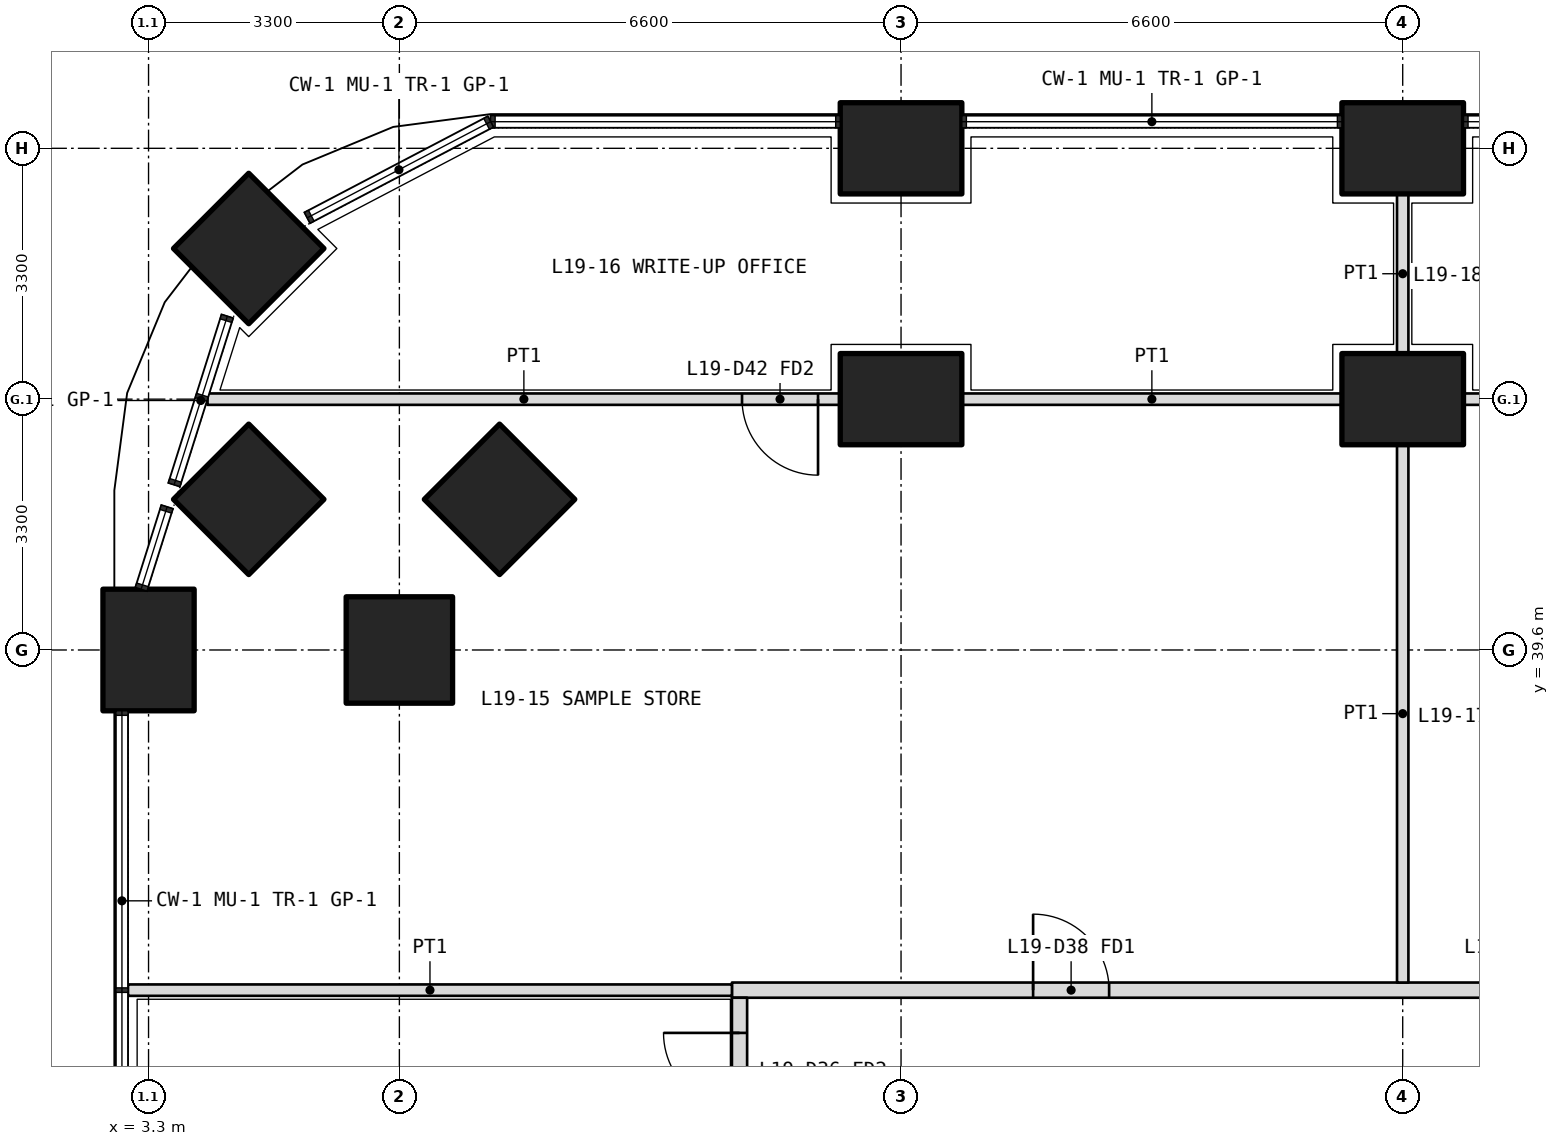
"""IFC4 building model, lengths in metres.
Left out: names, types, materials, properties, quantities, classifications, styles, units other than length and angle.
Written with IfcOpenShell. Run it as: python <this file> out.ifc"""

import sys

from ifc_helpers import new_model, si_unit, direction, frame, frame_2d, origin, origin_2d, place, context, subcontext, project, spatial, rectangle, extrude, element, fill, save


model = new_model("IFC4")
c1 = context("Model", 3, precision=1e-05, world=origin(), true_north=direction((0.0, 1.0)))
c2 = subcontext(c1, "Body", "Model", "MODEL_VIEW")
j1 = project(units=[si_unit("LENGTHUNIT", "METRE"), si_unit("PLANEANGLEUNIT", "RADIAN")], contexts=[c1])
p1 = place(None, origin())
s1 = spatial("IfcSite", under=j1, at=p1, CompositionType="ELEMENT")
p2 = place(p1, origin())
s2 = spatial("IfcBuilding", under=s1, at=p2, CompositionType="ELEMENT")
p3 = place(p2, frame((0.0, 0.0, 86.4)))
s3 = spatial("IfcBuildingStorey", under=s2, at=p3, CompositionType="ELEMENT", Elevation=86.4)
p4 = place(p3, frame((4.618, 44.882, 0.0), z_axis=(0.0, 0.0, 1.0), x_axis=(0.707106781187, 0.707106781187, 0.0)))
e1 = element("IfcColumn", 1, at=p4, inside=s3, PredefinedType="COLUMN", context=c2, shape_type="SweptSolid", body=[
    extrude(rectangle(XDim=1.4, YDim=1.4, at=origin_2d()), origin(), (0.0, 0.0, 1.0), 4.2),
])
for number, where, z_axis, x_axis in (
    (2, (3.3, 39.6, 0.0), (0.0, 0.0, 1.0), (0.0, 1.0, 0.0)),
    (3, (13.2, 46.2, 0.0), (0.0, 0.0, 1.0), (1.0, 0.0, 0.0)),
    (4, (19.8, 46.2, 0.0), (0.0, 0.0, 1.0), (1.0, 0.0, 0.0)),
):
    element("IfcColumn", number, at=place(p3, frame(where, z_axis=z_axis, x_axis=x_axis)), inside=s3, PredefinedType="COLUMN", context=c2, shape_type="SweptSolid", body=[
        extrude(rectangle(XDim=1.6, YDim=1.2, at=origin_2d()), origin(), (0.0, 0.0, 1.0), 4.2),
    ])
for number, where, z_axis, x_axis in (
    (5, (6.6, 39.6, 0.0), (0.0, 0.0, 1.0), (1.0, 0.0, 0.0)),
    (6, (4.618, 41.582, 0.0), (0.0, 0.0, 1.0), (0.707, 0.707, 0.0)),
):
    element("IfcColumn", number, at=place(p3, frame(where, z_axis=z_axis, x_axis=x_axis)), inside=s3, PredefinedType="COLUMN", context=c2, shape_type="SweptSolid", body=[
        extrude(rectangle(XDim=1.4, YDim=1.4, at=origin_2d()), origin(), (0.0, 0.0, 1.0), 4.2),
    ])
for number, where, z_axis, x_axis in (
    (7, (13.2, 42.9, 0.0), (0.0, 0.0, 1.0), (1.0, 0.0, 0.0)),
    (8, (19.8, 42.9, 0.0), (0.0, 0.0, 1.0), (1.0, 0.0, 0.0)),
):
    element("IfcColumn", number, at=place(p3, frame(where, z_axis=z_axis, x_axis=x_axis)), inside=s3, PredefinedType="COLUMN", context=c2, shape_type="SweptSolid", body=[
        extrude(rectangle(XDim=1.6, YDim=1.2, at=origin_2d()), origin(), (0.0, 0.0, 1.0), 4.2),
    ])
p5 = place(p3, frame((7.918, 41.582, 0.0), z_axis=(0.0, 0.0, 1.0), x_axis=(0.707106781187, 0.707106781187, 0.0)))
e9 = element("IfcColumn", 9, at=p5, inside=s3, PredefinedType="COLUMN", context=c2, shape_type="SweptSolid", body=[
    extrude(rectangle(XDim=1.4, YDim=1.4, at=origin_2d()), origin(), (0.0, 0.0, 1.0), 4.2),
])
p6 = place(p3, frame((10.975, 35.125, 0.0), z_axis=(0.0, 0.0, 1.0), x_axis=(1.0, 0.0, 0.0)))
e10 = element("IfcWall", 10, at=p6, inside=s3, PredefinedType="PARTITIONING", context=c2, shape_type="SweptSolid", body=[
    extrude(rectangle(XDim=30.85, YDim=0.2, at=frame_2d((15.425, 0.0))), origin(), (0.0, 0.0, 1.0), 2.85),
])
p7 = place(p6, frame((3.962, 0.0, 0.0)))
e11 = element("IfcOpeningElement", 11, at=p7, cuts=e10, PredefinedType="OPENING", context=c2, shape_type="SweptSolid", body=[
    extrude(rectangle(XDim=1.0, YDim=2.1, at=frame_2d((0.5, 1.05))), frame((0.0, 0.11, 0.0), z_axis=(0.0, -1.0, 0.0), x_axis=(1.0, 0.0, 0.0)), (0.0, 0.0, 1.0), 0.22),
])
p8 = place(p6, frame((9.975, 0.0, 0.0)))
e12 = element("IfcOpeningElement", 12, at=p8, cuts=e10, PredefinedType="OPENING", context=c2, shape_type="SweptSolid", body=[
    extrude(rectangle(XDim=1.0, YDim=2.1, at=frame_2d((0.5, 1.05))), frame((0.0, 0.11, 0.0), z_axis=(0.0, -1.0, 0.0), x_axis=(1.0, 0.0, 0.0)), (0.0, 0.0, 1.0), 0.22),
])
p9 = place(p6, frame((14.825, 0.0, 0.0)))
e13 = element("IfcOpeningElement", 13, at=p9, cuts=e10, PredefinedType="OPENING", context=c2, shape_type="SweptSolid", body=[
    extrude(rectangle(XDim=1.2, YDim=2.1, at=frame_2d((0.6, 1.05))), frame((0.0, 0.11, 0.0), z_axis=(0.0, -1.0, 0.0), x_axis=(1.0, 0.0, 0.0)), (0.0, 0.0, 1.0), 0.22),
])
p10 = place(p6, frame((24.238, 0.0, 0.0)))
e14 = element("IfcOpeningElement", 14, at=p10, cuts=e10, PredefinedType="OPENING", context=c2, shape_type="SweptSolid", body=[
    extrude(rectangle(XDim=1.0, YDim=2.1, at=frame_2d((0.5, 1.05))), frame((0.0, 0.11, 0.0), z_axis=(0.0, -1.0, 0.0), x_axis=(1.0, 0.0, 0.0)), (0.0, 0.0, 1.0), 0.22),
])
p11 = place(p3, frame((11.075, 7.4, 0.0), z_axis=(0.0, 0.0, 1.0), x_axis=(0.0, 1.0, 0.0)))
e15 = element("IfcWall", 15, at=p11, inside=s3, PredefinedType="PARTITIONING", context=c2, shape_type="SweptSolid", body=[
    extrude(rectangle(XDim=27.625, YDim=0.2, at=frame_2d((13.812, 0.0))), origin(), (0.0, 0.0, 1.0), 2.85),
])
p12 = place(p11, frame((2.35, 0.0, 0.0)))
e16 = element("IfcOpeningElement", 16, at=p12, cuts=e15, PredefinedType="OPENING", context=c2, shape_type="SweptSolid", body=[
    extrude(rectangle(XDim=1.0, YDim=2.1, at=frame_2d((0.5, 1.05))), frame((0.0, 0.11, 0.0), z_axis=(0.0, -1.0, 0.0), x_axis=(1.0, 0.0, 0.0)), (0.0, 0.0, 1.0), 0.22),
])
p13 = place(p11, frame((6.35, 0.0, 0.0)))
e17 = element("IfcOpeningElement", 17, at=p13, cuts=e15, PredefinedType="OPENING", context=c2, shape_type="SweptSolid", body=[
    extrude(rectangle(XDim=1.0, YDim=2.1, at=frame_2d((0.5, 1.05))), frame((0.0, 0.11, 0.0), z_axis=(0.0, -1.0, 0.0), x_axis=(1.0, 0.0, 0.0)), (0.0, 0.0, 1.0), 0.22),
])
p14 = place(p11, frame((9.425, 0.0, 0.0)))
e18 = element("IfcOpeningElement", 18, at=p14, cuts=e15, PredefinedType="OPENING", context=c2, shape_type="SweptSolid", body=[
    extrude(rectangle(XDim=0.9, YDim=2.1, at=frame_2d((0.45, 1.05))), frame((0.0, 0.11, 0.0), z_axis=(0.0, -1.0, 0.0), x_axis=(1.0, 0.0, 0.0)), (0.0, 0.0, 1.0), 0.22),
])
p15 = place(p11, frame((13.275, 0.0, 0.0)))
e19 = element("IfcOpeningElement", 19, at=p15, cuts=e15, PredefinedType="OPENING", context=c2, shape_type="SweptSolid", body=[
    extrude(rectangle(XDim=0.9, YDim=2.1, at=frame_2d((0.45, 1.05))), frame((0.0, 0.11, 0.0), z_axis=(0.0, -1.0, 0.0), x_axis=(1.0, 0.0, 0.0)), (0.0, 0.0, 1.0), 0.22),
])
p16 = place(p11, frame((16.8, 0.0, 0.0)))
e20 = element("IfcOpeningElement", 20, at=p16, cuts=e15, PredefinedType="OPENING", context=c2, shape_type="SweptSolid", body=[
    extrude(rectangle(XDim=1.0, YDim=2.1, at=frame_2d((0.5, 1.05))), frame((0.0, 0.11, 0.0), z_axis=(0.0, -1.0, 0.0), x_axis=(1.0, 0.0, 0.0)), (0.0, 0.0, 1.0), 0.22),
])
p17 = place(p11, frame((20.15, 0.0, 0.0)))
e21 = element("IfcOpeningElement", 21, at=p17, cuts=e15, PredefinedType="OPENING", context=c2, shape_type="SweptSolid", body=[
    extrude(rectangle(XDim=1.0, YDim=2.1, at=frame_2d((0.5, 1.05))), frame((0.0, 0.11, 0.0), z_axis=(0.0, -1.0, 0.0), x_axis=(1.0, 0.0, 0.0)), (0.0, 0.0, 1.0), 0.22),
])
p18 = place(p11, frame((23.45, 0.0, 0.0)))
e22 = element("IfcOpeningElement", 22, at=p18, cuts=e15, PredefinedType="OPENING", context=c2, shape_type="SweptSolid", body=[
    extrude(rectangle(XDim=1.0, YDim=2.1, at=frame_2d((0.5, 1.05))), frame((0.0, 0.11, 0.0), z_axis=(0.0, -1.0, 0.0), x_axis=(1.0, 0.0, 0.0)), (0.0, 0.0, 1.0), 0.22),
])
p19 = place(p11, frame((26.163, 0.0, 0.0)))
e23 = element("IfcOpeningElement", 23, at=p19, cuts=e15, PredefinedType="OPENING", context=c2, shape_type="SweptSolid", body=[
    extrude(rectangle(XDim=1.0, YDim=2.1, at=frame_2d((0.5, 1.05))), frame((0.0, 0.11, 0.0), z_axis=(0.0, -1.0, 0.0), x_axis=(1.0, 0.0, 0.0)), (0.0, 0.0, 1.0), 0.22),
])
p20 = place(p3, frame((3.03, 35.125, 0.0), z_axis=(0.0, 0.0, 1.0), x_axis=(1.0, 0.0, 0.0)))
e24 = element("IfcWall", 24, at=p20, inside=s3, PredefinedType="PARTITIONING", context=c2, shape_type="SweptSolid", body=[
    extrude(rectangle(XDim=7.945, YDim=0.15, at=frame_2d((3.973, 0.0))), origin(), (0.0, 0.0, 1.0), 2.7),
])
p21 = place(p3, frame((25.6, 42.9, 0.0), z_axis=(0.0, 0.0, 1.0), x_axis=(-1.0, 0.0, 0.0)))
e25 = element("IfcWall", 25, at=p21, inside=s3, PredefinedType="PARTITIONING", context=c2, shape_type="SweptSolid", body=[
    extrude(rectangle(XDim=5.0, YDim=0.15, at=frame_2d((2.5, 0.0))), origin(), (0.0, 0.0, 1.0), 3.9),
])
p22 = place(p21, frame((3.65, 0.0, 0.0)))
e26 = element("IfcOpeningElement", 26, at=p22, cuts=e25, PredefinedType="OPENING", context=c2, shape_type="SweptSolid", body=[
    extrude(rectangle(XDim=1.0, YDim=2.1, at=frame_2d((0.5, 1.05))), frame((0.0, 0.085, 0.0), z_axis=(0.0, -1.0, 0.0), x_axis=(1.0, 0.0, 0.0)), (0.0, 0.0, 1.0), 0.17),
])
p23 = place(p21, frame((0.25, 0.0, 0.0)))
e27 = element("IfcOpeningElement", 27, at=p23, cuts=e25, PredefinedType="OPENING", context=c2, shape_type="SweptSolid", body=[
    extrude(rectangle(XDim=1.0, YDim=2.1, at=frame_2d((0.5, 1.05))), frame((0.0, 0.085, 0.0), z_axis=(0.0, -1.0, 0.0), x_axis=(1.0, 0.0, 0.0)), (0.0, 0.0, 1.0), 0.17),
])
p24 = place(p3, frame((19.0, 42.9, 0.0), z_axis=(0.0, 0.0, 1.0), x_axis=(-1.0, 0.0, 0.0)))
e28 = element("IfcWall", 28, at=p24, inside=s3, PredefinedType="PARTITIONING", context=c2, shape_type="SweptSolid", body=[
    extrude(rectangle(XDim=5.0, YDim=0.15, at=frame_2d((2.5, 0.0))), origin(), (0.0, 0.0, 1.0), 3.9),
])
p25 = place(p3, frame((12.4, 42.9, 0.0), z_axis=(0.0, 0.0, 1.0), x_axis=(-1.0, 0.0, 0.0)))
e29 = element("IfcWall", 29, at=p25, inside=s3, PredefinedType="PARTITIONING", context=c2, shape_type="SweptSolid", body=[
    extrude(rectangle(XDim=8.324, YDim=0.15, at=frame_2d((4.162, 0.0))), origin(), (0.0, 0.0, 1.0), 2.7),
])
p26 = place(p25, frame((0.292, 0.0, 0.0)))
e30 = element("IfcOpeningElement", 30, at=p26, cuts=e29, PredefinedType="OPENING", context=c2, shape_type="SweptSolid", body=[
    extrude(rectangle(XDim=1.0, YDim=2.1, at=frame_2d((0.5, 1.05))), frame((0.0, 0.085, 0.0), z_axis=(0.0, -1.0, 0.0), x_axis=(1.0, 0.0, 0.0)), (0.0, 0.0, 1.0), 0.17),
])
p27 = place(p3, frame((19.8, 45.6, 0.0), z_axis=(0.0, 0.0, 1.0), x_axis=(0.0, -1.0, 0.0)))
e31 = element("IfcWall", 31, at=p27, inside=s3, PredefinedType="PARTITIONING", context=c2, shape_type="SweptSolid", body=[
    extrude(rectangle(XDim=2.1, YDim=0.15, at=frame_2d((1.05, 0.0))), origin(), (0.0, 0.0, 1.0), 2.85),
])
p28 = place(p3, frame((19.8, 42.3, 0.0), z_axis=(0.0, 0.0, 1.0), x_axis=(0.0, -1.0, 0.0)))
e32 = element("IfcWall", 32, at=p28, inside=s3, PredefinedType="PARTITIONING", context=c2, shape_type="SweptSolid", body=[
    extrude(rectangle(XDim=7.075, YDim=0.15, at=frame_2d((3.538, 0.0))), origin(), (0.0, 0.0, 1.0), 2.85),
])
p29 = place(p7, origin())
e33 = element("IfcDoor", 33, at=p29, inside=s3, OperationType="SINGLE_SWING_LEFT", PredefinedType="DOOR", context=c2, shape_type="SweptSolid", body=[
    extrude(rectangle(XDim=1.0, YDim=2.1, at=frame_2d((0.5, 1.05))), frame((0.0, 0.025, 0.0), z_axis=(0.0, -1.0, 0.0), x_axis=(1.0, 0.0, 0.0)), (0.0, 0.0, 1.0), 0.05),
])
fill(e11, e33)
p30 = place(p26, origin())
e34 = element("IfcDoor", 34, at=p30, inside=s3, OperationType="SINGLE_SWING_LEFT", PredefinedType="DOOR", context=c2, shape_type="SweptSolid", body=[
    extrude(rectangle(XDim=1.0, YDim=2.1, at=frame_2d((0.5, 1.05))), frame((0.0, 0.025, 0.0), z_axis=(0.0, -1.0, 0.0), x_axis=(1.0, 0.0, 0.0)), (0.0, 0.0, 1.0), 0.05),
])
fill(e30, e34)
p31 = place(p19, origin())
e35 = element("IfcDoor", 35, at=p31, inside=s3, OperationType="SINGLE_SWING_RIGHT", PredefinedType="DOOR", context=c2, shape_type="SweptSolid", body=[
    extrude(rectangle(XDim=1.0, YDim=2.1, at=frame_2d((0.5, 1.05))), frame((0.0, 0.025, 0.0), z_axis=(0.0, -1.0, 0.0), x_axis=(1.0, 0.0, 0.0)), (0.0, 0.0, 1.0), 0.05),
])
fill(e23, e35)
save(model, sys.argv[1])
